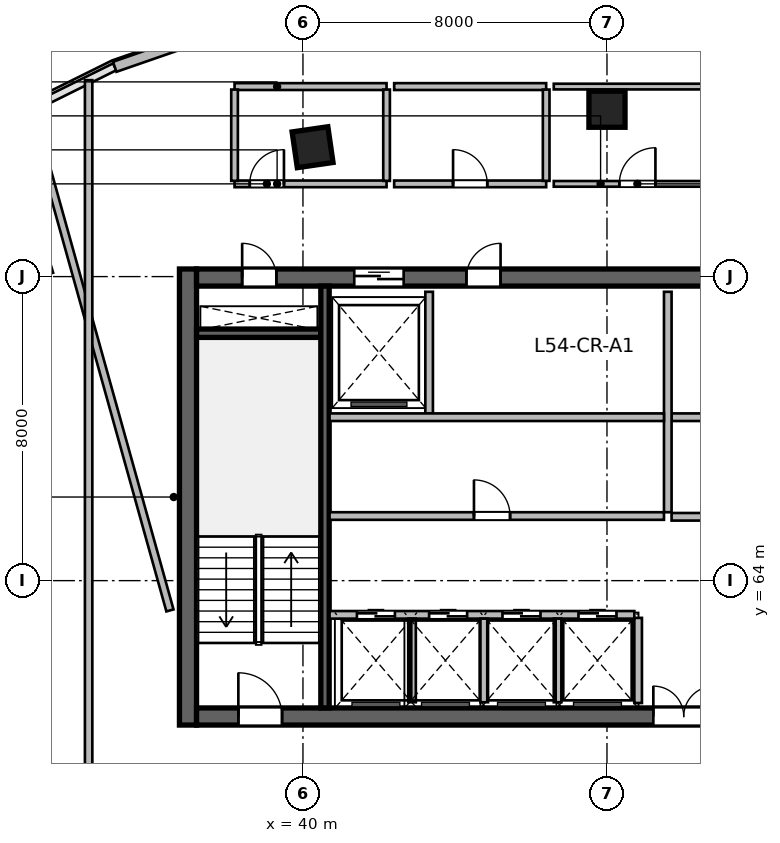
"""IFC4 building model, lengths in metres.
Left out: names, types, materials, properties, quantities, classifications, styles, units other than length and angle.
Written with IfcOpenShell. Run it as: python <this file> out.ifc"""

import sys

from ifc_helpers import new_model, si_unit, direction, frame, frame_2d, origin, origin_2d, place, context, subcontext, project, spatial, rectangle, extrude, source, transform, mapped, element, fill, save


model = new_model("IFC4")
c1 = context("Model", 3, precision=1e-05, world=origin(), true_north=direction((0.0, 1.0)))
c2 = subcontext(c1, "Body", "Model", "MODEL_VIEW")
j1 = project(units=[si_unit("LENGTHUNIT", "METRE"), si_unit("PLANEANGLEUNIT", "RADIAN")], contexts=[c1])
p1 = place(None, origin())
s1 = spatial("IfcSite", under=j1, at=p1, CompositionType="ELEMENT")
p2 = place(p1, origin())
s2 = spatial("IfcBuilding", under=s1, at=p2, CompositionType="ELEMENT")
p3 = place(p2, frame((0.0, 0.0, 223.5)))
s3 = spatial("IfcBuildingStorey", under=s2, at=p3, CompositionType="ELEMENT", Elevation=223.5)
m1 = source(origin(), c2, "Body", "SweptSolid", [
    extrude(rectangle(XDim=12.0, YDim=0.45, at=frame_2d((6.0, 0.0))), origin(), (0.0, 0.0, 1.0), 3.9),
])
p4 = place(p3, frame((36.975, 60.2, 0.0), z_axis=(0.0, 0.0, 1.0), x_axis=(0.0, 1.0, 0.0)))
e1 = element("IfcWall", 1, at=p4, inside=s3, PredefinedType="SHEAR", context=c2, shape_type="MappedRepresentation", body=[
    mapped(m1, transform((0.0, 0.0, 0.0), scale=1.0)),
])
m2 = source(origin(), c2, "Body", "SweptSolid", [
    extrude(rectangle(XDim=21.6, YDim=0.45, at=frame_2d((10.8, 0.0))), origin(), (0.0, 0.0, 1.0), 3.9),
])
p5 = place(p3, frame((37.2, 60.425, 0.0), z_axis=(0.0, 0.0, 1.0), x_axis=(1.0, 0.0, 0.0)))
e2 = element("IfcWall", 2, at=p5, inside=s3, PredefinedType="SHEAR", context=c2, shape_type="MappedRepresentation", body=[
    mapped(m2, transform((0.0, 0.0, 0.0), scale=1.0)),
])
p6 = place(p5, frame((1.1, 0.0, 0.0)))
e3 = element("IfcOpeningElement", 3, at=p6, cuts=e2, PredefinedType="OPENING", context=c2, shape_type="SweptSolid", body=[
    extrude(rectangle(XDim=1.15, YDim=2.15, at=frame_2d((0.575, 1.075))), frame((0.0, 0.235, 0.0), z_axis=(0.0, -1.0, 0.0), x_axis=(1.0, 0.0, 0.0)), (0.0, 0.0, 1.0), 0.47),
])
p7 = place(p5, frame((19.5, 0.0, 0.0)))
e4 = element("IfcOpeningElement", 4, at=p7, cuts=e2, PredefinedType="OPENING", context=c2, shape_type="SweptSolid", body=[
    extrude(rectangle(XDim=0.9, YDim=2.1, at=frame_2d((0.45, 1.05))), frame((0.0, 0.235, 0.0), z_axis=(0.0, -1.0, 0.0), x_axis=(1.0, 0.0, 0.0)), (0.0, 0.0, 1.0), 0.47),
])
p8 = place(p5, frame((12.02, 0.0, 0.0)))
e5 = element("IfcOpeningElement", 5, at=p8, cuts=e2, PredefinedType="OPENING", context=c2, shape_type="SweptSolid", body=[
    extrude(rectangle(XDim=1.6, YDim=2.15, at=frame_2d((0.8, 1.075))), frame((0.0, 0.235, 0.0), z_axis=(0.0, -1.0, 0.0), x_axis=(1.0, 0.0, 0.0)), (0.0, 0.0, 1.0), 0.47),
])
p9 = place(p3, frame((37.2, 71.975, 0.0), z_axis=(0.0, 0.0, 1.0), x_axis=(1.0, 0.0, 0.0)))
e6 = element("IfcWall", 6, at=p9, inside=s3, PredefinedType="SHEAR", context=c2, shape_type="MappedRepresentation", body=[
    mapped(m2, transform((0.0, 0.0, 0.0), scale=1.0)),
])
p10 = place(p9, frame((1.2, 0.0, 0.0)))
e7 = element("IfcOpeningElement", 7, at=p10, cuts=e6, PredefinedType="OPENING", context=c2, shape_type="SweptSolid", body=[
    extrude(rectangle(XDim=0.9, YDim=2.1, at=frame_2d((0.45, 1.05))), frame((0.0, 0.235, 0.0), z_axis=(0.0, -1.0, 0.0), x_axis=(1.0, 0.0, 0.0)), (0.0, 0.0, 1.0), 0.47),
])
p11 = place(p9, frame((14.7, 0.0, 0.0)))
e8 = element("IfcOpeningElement", 8, at=p11, cuts=e6, PredefinedType="OPENING", context=c2, shape_type="SweptSolid", body=[
    extrude(rectangle(XDim=1.2, YDim=2.15, at=frame_2d((0.6, 1.075))), frame((0.0, 0.235, 0.0), z_axis=(0.0, -1.0, 0.0), x_axis=(1.0, 0.0, 0.0)), (0.0, 0.0, 1.0), 0.47),
])
p12 = place(p9, frame((4.15, 0.0, 0.0)))
e9 = element("IfcOpeningElement", 9, at=p12, cuts=e6, PredefinedType="OPENING", context=c2, shape_type="SweptSolid", body=[
    extrude(rectangle(XDim=1.3, YDim=2.15, at=frame_2d((0.65, 1.075))), frame((0.0, 0.235, 0.0), z_axis=(0.0, -1.0, 0.0), x_axis=(1.0, 0.0, 0.0)), (0.0, 0.0, 1.0), 0.47),
])
p13 = place(p9, frame((7.1, 0.0, 0.0)))
e10 = element("IfcOpeningElement", 10, at=p13, cuts=e6, PredefinedType="OPENING", context=c2, shape_type="SweptSolid", body=[
    extrude(rectangle(XDim=0.9, YDim=2.1, at=frame_2d((0.45, 1.05))), frame((0.0, 0.235, 0.0), z_axis=(0.0, -1.0, 0.0), x_axis=(1.0, 0.0, 0.0)), (0.0, 0.0, 1.0), 0.47),
])
m3 = source(origin(), c2, "Body", "SweptSolid", [
    extrude(rectangle(XDim=3.27, YDim=0.22, at=frame_2d((1.635, 0.0))), origin(), (0.0, 0.0, 1.0), 3.9),
])
p14 = place(p3, frame((37.2, 70.51, 0.0), z_axis=(0.0, 0.0, 1.0), x_axis=(1.0, 0.0, 0.0)))
e11 = element("IfcWall", 11, at=p14, inside=s3, PredefinedType="SHEAR", context=c2, shape_type="MappedRepresentation", body=[
    mapped(m3, transform((0.0, 0.0, 0.0), scale=1.0)),
])
m4 = source(origin(), c2, "Body", "SweptSolid", [
    extrude(rectangle(XDim=11.1, YDim=0.22, at=frame_2d((5.55, 0.0))), origin(), (0.0, 0.0, 1.0), 3.9),
])
p15 = place(p3, frame((40.58, 60.65, 0.0), z_axis=(0.0, 0.0, 1.0), x_axis=(0.0, 1.0, 0.0)))
e12 = element("IfcWall", 12, at=p15, inside=s3, PredefinedType="SHEAR", context=c2, shape_type="MappedRepresentation", body=[
    mapped(m4, transform((0.0, 0.0, 0.0), scale=1.0)),
])
m5 = source(origin(), c2, "Body", "SweptSolid", [
    extrude(rectangle(XDim=0.95, YDim=0.95, at=origin_2d()), origin(), (0.0, 0.0, 1.0), 3.9),
])
for number, where, z_axis, x_axis in (
    (13, (40.253, 75.404, 0.0), (0.0, 0.0, 1.0), (-0.143, 0.99, 0.0)),
    (14, (48.0, 76.404, 0.0), (0.0, 0.0, 1.0), (0.0, 1.0, 0.0)),
):
    element("IfcColumn", number, at=place(p3, frame(where, z_axis=z_axis, x_axis=x_axis)), inside=s3, PredefinedType="COLUMN", context=c2, shape_type="MappedRepresentation", body=[
        mapped(m5, transform((0.0, 0.0, 0.0), scale=1.0)),
    ])
m6 = source(origin(), c2, "Body", "SweptSolid", [
    extrude(rectangle(XDim=4.492, YDim=0.28, at=frame_2d((2.246, 0.0))), origin(), (0.0, 0.0, 1.0), 3.64),
])
p16 = place(p3, frame((35.046, 77.52, 0.0), z_axis=(0.0, 0.0, 1.0), x_axis=(0.944872297412, 0.32743906545, 0.0)))
e15 = element("IfcWall", 15, at=p16, inside=s3, PredefinedType="SOLIDWALL", context=c2, shape_type="MappedRepresentation", body=[
    mapped(m6, transform((0.0, 0.0, 0.0), scale=1.0)),
])
m7 = source(origin(), c2, "Body", "SweptSolid", [
    extrude(rectangle(XDim=2.24, YDim=0.2, at=frame_2d((1.12, 0.0))), origin(), (0.0, 0.0, 1.0), 3.64),
])
p17 = place(p3, frame((48.82, 60.78, 0.0), z_axis=(0.0, 0.0, 1.0), x_axis=(0.0, 1.0, 0.0)))
e16 = element("IfcWall", 16, at=p17, inside=s3, PredefinedType="SOLIDWALL", context=c2, shape_type="MappedRepresentation", body=[
    mapped(m7, transform((0.0, 0.0, 0.0), scale=1.0)),
])
m8 = source(origin(), c2, "Body", "SweptSolid", [
    extrude(rectangle(XDim=5.62, YDim=0.2, at=frame_2d((2.81, 0.0))), origin(), (0.0, 0.0, 1.0), 3.64),
])
p18 = place(p3, frame((49.7, 68.3, 0.0), z_axis=(0.0, 0.0, 1.0), x_axis=(1.0, 0.0, 0.0)))
e17 = element("IfcWall", 17, at=p18, inside=s3, PredefinedType="SOLIDWALL", context=c2, shape_type="MappedRepresentation", body=[
    mapped(m8, transform((0.0, 0.0, 0.0), scale=1.0)),
])
p19 = place(p18, frame((1.6, 0.0, 0.0)))
e18 = element("IfcOpeningElement", 18, at=p19, cuts=e17, PredefinedType="OPENING", context=c2, shape_type="SweptSolid", body=[
    extrude(rectangle(XDim=1.1, YDim=2.15, at=frame_2d((0.55, 1.075))), frame((0.0, 0.11, 0.0), z_axis=(0.0, -1.0, 0.0), x_axis=(1.0, 0.0, 0.0)), (0.0, 0.0, 1.0), 0.22),
])
p20 = place(p18, frame((3.7, 0.0, 0.0)))
e19 = element("IfcOpeningElement", 19, at=p20, cuts=e17, PredefinedType="OPENING", context=c2, shape_type="SweptSolid", body=[
    extrude(rectangle(XDim=1.1, YDim=2.15, at=frame_2d((0.55, 1.075))), frame((0.0, 0.11, 0.0), z_axis=(0.0, -1.0, 0.0), x_axis=(1.0, 0.0, 0.0)), (0.0, 0.0, 1.0), 0.22),
])
m9 = source(origin(), c2, "Body", "SweptSolid", [
    extrude(rectangle(XDim=5.8, YDim=0.2, at=frame_2d((2.9, 0.0))), origin(), (0.0, 0.0, 1.0), 3.64),
])
p21 = place(p3, frame((49.6, 65.8, 0.0), z_axis=(0.0, 0.0, 1.0), x_axis=(0.0, 1.0, 0.0)))
e20 = element("IfcWall", 20, at=p21, inside=s3, PredefinedType="SOLIDWALL", context=c2, shape_type="MappedRepresentation", body=[
    mapped(m9, transform((0.0, 0.0, 0.0), scale=1.0)),
])
p22 = place(p3, frame((49.7, 65.68, 0.0), z_axis=(0.0, 0.0, 1.0), x_axis=(1.0, 0.0, 0.0)))
e21 = element("IfcWall", 21, at=p22, inside=s3, PredefinedType="SOLIDWALL", context=c2, shape_type="MappedRepresentation", body=[
    mapped(m8, transform((0.0, 0.0, 0.0), scale=1.0)),
])
m10 = source(origin(), c2, "Body", "SweptSolid", [
    extrude(rectangle(XDim=3.2, YDim=0.2, at=frame_2d((1.6, 0.0))), origin(), (0.0, 0.0, 1.0), 3.64),
])
p23 = place(p3, frame((43.32, 68.4, 0.0), z_axis=(0.0, 0.0, 1.0), x_axis=(0.0, 1.0, 0.0)))
e22 = element("IfcWall", 22, at=p23, inside=s3, PredefinedType="SOLIDWALL", context=c2, shape_type="MappedRepresentation", body=[
    mapped(m10, transform((0.0, 0.0, 0.0), scale=1.0)),
])
m11 = source(origin(), c2, "Body", "SweptSolid", [
    extrude(rectangle(XDim=8.8, YDim=0.2, at=frame_2d((4.4, 0.0))), origin(), (0.0, 0.0, 1.0), 3.64),
])
p24 = place(p3, frame((40.7, 68.3, 0.0), z_axis=(0.0, 0.0, 1.0), x_axis=(1.0, 0.0, 0.0)))
e23 = element("IfcWall", 23, at=p24, inside=s3, PredefinedType="SOLIDWALL", context=c2, shape_type="MappedRepresentation", body=[
    mapped(m11, transform((0.0, 0.0, 0.0), scale=1.0)),
])
m12 = source(origin(), c2, "Body", "SweptSolid", [
    extrude(rectangle(XDim=8.02, YDim=0.2, at=frame_2d((4.01, 0.0))), origin(), (0.0, 0.0, 1.0), 3.64),
])
p25 = place(p3, frame((40.7, 63.1, 0.0), z_axis=(0.0, 0.0, 1.0), x_axis=(1.0, 0.0, 0.0)))
e24 = element("IfcWall", 24, at=p25, inside=s3, PredefinedType="SOLIDWALL", context=c2, shape_type="MappedRepresentation", body=[
    mapped(m12, transform((0.0, 0.0, 0.0), scale=1.0)),
])
p26 = place(p25, frame((0.72, 0.0, 0.0)))
e25 = element("IfcOpeningElement", 25, at=p26, cuts=e24, PredefinedType="OPENING", context=c2, shape_type="SweptSolid", body=[
    extrude(rectangle(XDim=1.0, YDim=2.15, at=frame_2d((0.5, 1.075))), frame((0.0, 0.11, 0.0), z_axis=(0.0, -1.0, 0.0), x_axis=(1.0, 0.0, 0.0)), (0.0, 0.0, 1.0), 0.22),
])
p27 = place(p25, frame((2.62, 0.0, 0.0)))
e26 = element("IfcOpeningElement", 26, at=p27, cuts=e24, PredefinedType="OPENING", context=c2, shape_type="SweptSolid", body=[
    extrude(rectangle(XDim=1.0, YDim=2.15, at=frame_2d((0.5, 1.075))), frame((0.0, 0.11, 0.0), z_axis=(0.0, -1.0, 0.0), x_axis=(1.0, 0.0, 0.0)), (0.0, 0.0, 1.0), 0.22),
])
p28 = place(p25, frame((4.55, 0.0, 0.0)))
e27 = element("IfcOpeningElement", 27, at=p28, cuts=e24, PredefinedType="OPENING", context=c2, shape_type="SweptSolid", body=[
    extrude(rectangle(XDim=1.0, YDim=2.15, at=frame_2d((0.5, 1.075))), frame((0.0, 0.11, 0.0), z_axis=(0.0, -1.0, 0.0), x_axis=(1.0, 0.0, 0.0)), (0.0, 0.0, 1.0), 0.22),
])
p29 = place(p25, frame((6.55, 0.0, 0.0)))
e28 = element("IfcOpeningElement", 28, at=p29, cuts=e24, PredefinedType="OPENING", context=c2, shape_type="SweptSolid", body=[
    extrude(rectangle(XDim=1.0, YDim=2.15, at=frame_2d((0.5, 1.075))), frame((0.0, 0.11, 0.0), z_axis=(0.0, -1.0, 0.0), x_axis=(1.0, 0.0, 0.0)), (0.0, 0.0, 1.0), 0.22),
])
m13 = source(origin(), c2, "Body", "SweptSolid", [
    extrude(rectangle(XDim=2.2, YDim=0.2, at=frame_2d((1.1, 0.0))), origin(), (0.0, 0.0, 1.0), 3.64),
])
for number, where, z_axis, x_axis in (
    (29, (42.87, 60.8, 0.0), (0.0, 0.0, 1.0), (0.0, 1.0, 0.0)),
    (30, (44.77, 60.8, 0.0), (0.0, 0.0, 1.0), (0.0, 1.0, 0.0)),
    (31, (46.7, 60.8, 0.0), (0.0, 0.0, 1.0), (0.0, 1.0, 0.0)),
):
    element("IfcWall", number, at=place(p3, frame(where, z_axis=z_axis, x_axis=x_axis)), inside=s3, PredefinedType="SOLIDWALL", context=c2, shape_type="MappedRepresentation", body=[
        mapped(m13, transform((0.0, 0.0, 0.0), scale=1.0)),
    ])
p30 = place(p3, frame((40.7, 65.7, 0.0), z_axis=(0.0, 0.0, 1.0), x_axis=(1.0, 0.0, 0.0)))
e32 = element("IfcWall", 32, at=p30, inside=s3, PredefinedType="SOLIDWALL", context=c2, shape_type="MappedRepresentation", body=[
    mapped(m11, transform((0.0, 0.0, 0.0), scale=1.0)),
])
p31 = place(p30, frame((3.8, 0.0, 0.0)))
e33 = element("IfcOpeningElement", 33, at=p31, cuts=e32, PredefinedType="OPENING", context=c2, shape_type="SweptSolid", body=[
    extrude(rectangle(XDim=0.95, YDim=2.15, at=frame_2d((0.475, 1.075))), frame((0.0, 0.11, 0.0), z_axis=(0.0, -1.0, 0.0), x_axis=(1.0, 0.0, 0.0)), (0.0, 0.0, 1.0), 0.22),
])
m14 = source(origin(), c2, "Body", "SweptSolid", [
    extrude(rectangle(XDim=4.0, YDim=0.175, at=frame_2d((2.0, 0.0))), origin(), (0.0, 0.0, 1.0), 3.64),
])
p32 = place(p3, frame((38.2, 74.44, 0.0), z_axis=(0.0, 0.0, 1.0), x_axis=(1.0, 0.0, 0.0)))
e34 = element("IfcWall", 34, at=p32, inside=s3, PredefinedType="PARTITIONING", context=c2, shape_type="MappedRepresentation", body=[
    mapped(m14, transform((0.0, 0.0, 0.0), scale=1.0)),
])
p33 = place(p32, frame((0.4, 0.0, 0.0)))
e35 = element("IfcOpeningElement", 35, at=p33, cuts=e34, PredefinedType="OPENING", context=c2, shape_type="SweptSolid", body=[
    extrude(rectangle(XDim=0.9, YDim=2.08, at=frame_2d((0.45, 1.04))), frame((0.0, 0.098, 0.0), z_axis=(0.0, -1.0, 0.0), x_axis=(1.0, 0.0, 0.0)), (0.0, 0.0, 1.0), 0.195),
])
m15 = source(origin(), c2, "Body", "SweptSolid", [
    extrude(rectangle(XDim=4.0, YDim=0.18, at=frame_2d((2.0, 0.0))), origin(), (0.0, 0.0, 1.0), 3.64),
])
p34 = place(p3, frame((38.2, 77.0, 0.0), z_axis=(0.0, 0.0, 1.0), x_axis=(1.0, 0.0, 0.0)))
e36 = element("IfcWall", 36, at=p34, inside=s3, PredefinedType="PLUMBINGWALL", context=c2, shape_type="MappedRepresentation", body=[
    mapped(m15, transform((0.0, 0.0, 0.0), scale=1.0)),
])
m16 = source(origin(), c2, "Body", "SweptSolid", [
    extrude(rectangle(XDim=2.403, YDim=0.175, at=frame_2d((1.201, 0.0))), origin(), (0.0, 0.0, 1.0), 3.64),
])
for number, where, z_axis, x_axis in (
    (37, (38.2, 74.519, 0.0), (0.0, 0.0, 1.0), (0.0, 1.0, 0.0)),
    (38, (42.2, 74.519, 0.0), (0.0, 0.0, 1.0), (0.0, 1.0, 0.0)),
):
    element("IfcWall", number, at=place(p3, frame(where, z_axis=z_axis, x_axis=x_axis)), inside=s3, PredefinedType="PARTITIONING", context=c2, shape_type="MappedRepresentation", body=[
        mapped(m16, transform((0.0, 0.0, 0.0), scale=1.0)),
    ])
p35 = place(p3, frame((42.4, 74.44, 0.0), z_axis=(0.0, 0.0, 1.0), x_axis=(1.0, 0.0, 0.0)))
e39 = element("IfcWall", 39, at=p35, inside=s3, PredefinedType="PARTITIONING", context=c2, shape_type="MappedRepresentation", body=[
    mapped(m14, transform((0.0, 0.0, 0.0), scale=1.0)),
])
p36 = place(p35, frame((1.55, 0.0, 0.0)))
e40 = element("IfcOpeningElement", 40, at=p36, cuts=e39, PredefinedType="OPENING", context=c2, shape_type="SweptSolid", body=[
    extrude(rectangle(XDim=0.9, YDim=2.08, at=frame_2d((0.45, 1.04))), frame((0.0, 0.098, 0.0), z_axis=(0.0, -1.0, 0.0), x_axis=(1.0, 0.0, 0.0)), (0.0, 0.0, 1.0), 0.195),
])
p37 = place(p3, frame((42.4, 77.0, 0.0), z_axis=(0.0, 0.0, 1.0), x_axis=(1.0, 0.0, 0.0)))
e41 = element("IfcWall", 41, at=p37, inside=s3, PredefinedType="PLUMBINGWALL", context=c2, shape_type="MappedRepresentation", body=[
    mapped(m15, transform((0.0, 0.0, 0.0), scale=1.0)),
])
p38 = place(p3, frame((46.4, 74.519, 0.0), z_axis=(0.0, 0.0, 1.0), x_axis=(0.0, 1.0, 0.0)))
e42 = element("IfcWall", 42, at=p38, inside=s3, PredefinedType="PARTITIONING", context=c2, shape_type="MappedRepresentation", body=[
    mapped(m16, transform((0.0, 0.0, 0.0), scale=1.0)),
])
m17 = source(origin(), c2, "Body", "SweptSolid", [
    extrude(rectangle(XDim=4.4, YDim=0.15, at=frame_2d((2.2, 0.0))), origin(), (0.0, 0.0, 1.0), 3.64),
])
p39 = place(p3, frame((46.6, 74.44, 0.0), z_axis=(0.0, 0.0, 1.0), x_axis=(1.0, 0.0, 0.0)))
e43 = element("IfcWall", 43, at=p39, inside=s3, PredefinedType="PARTITIONING", context=c2, shape_type="MappedRepresentation", body=[
    mapped(m17, transform((0.0, 0.0, 0.0), scale=1.0)),
])
p40 = place(p39, frame((1.725, 0.0, 0.0)))
e44 = element("IfcOpeningElement", 44, at=p40, cuts=e43, PredefinedType="OPENING", context=c2, shape_type="SweptSolid", body=[
    extrude(rectangle(XDim=0.95, YDim=2.1, at=frame_2d((0.475, 1.05))), frame((0.0, 0.085, 0.0), z_axis=(0.0, -1.0, 0.0), x_axis=(1.0, 0.0, 0.0)), (0.0, 0.0, 1.0), 0.17),
])
p41 = place(p3, frame((46.6, 77.0, 0.0), z_axis=(0.0, 0.0, 1.0), x_axis=(1.0, 0.0, 0.0)))
e45 = element("IfcWall", 45, at=p41, inside=s3, PredefinedType="PARTITIONING", context=c2, shape_type="MappedRepresentation", body=[
    mapped(m17, transform((0.0, 0.0, 0.0), scale=1.0)),
])
m18 = source(origin(), c2, "Body", "SweptSolid", [
    extrude(rectangle(XDim=13.694, YDim=0.195, at=frame_2d((6.847, 0.0))), origin(), (0.0, 0.0, 1.0), 3.64),
])
p42 = place(p3, frame((36.5, 63.216, 0.0), z_axis=(0.0, 0.0, 1.0), x_axis=(-0.268753576604, 0.963208967495, 0.0)))
e46 = element("IfcWall", 46, at=p42, inside=s3, PredefinedType="PARTITIONING", context=c2, shape_type="MappedRepresentation", body=[
    mapped(m18, transform((0.0, 0.0, 0.0), scale=1.0)),
])
m19 = source(origin(), c2, "Body", "SweptSolid", [
    extrude(rectangle(XDim=19.209, YDim=0.195, at=frame_2d((9.604, 0.0))), origin(), (0.0, 0.0, 1.0), 3.64),
])
p43 = place(p3, frame((34.36, 57.96, 0.0), z_axis=(0.0, 0.0, 1.0), x_axis=(0.0, 1.0, 0.0)))
e47 = element("IfcWall", 47, at=p43, inside=s3, PredefinedType="PARTITIONING", context=c2, shape_type="MappedRepresentation", body=[
    mapped(m19, transform((0.0, 0.0, 0.0), scale=1.0)),
])
m20 = source(origin(), c2, "Body", "SweptSolid", [
    extrude(rectangle(XDim=1.15, YDim=2.15, at=frame_2d((0.575, 1.075))), frame((0.0, 0.025, 0.0), z_axis=(0.0, -1.0, 0.0), x_axis=(1.0, 0.0, 0.0)), (0.0, 0.0, 1.0), 0.05),
])
p44 = place(p6, origin())
e48 = element("IfcDoor", 48, at=p44, inside=s3, OperationType="SINGLE_SWING_LEFT", PredefinedType="DOOR", context=c2, shape_type="MappedRepresentation", body=[
    mapped(m20, transform((0.0, 0.0, 0.0), scale=1.0)),
])
fill(e3, e48)
m21 = source(origin(), c2, "Body", "SweptSolid", [
    extrude(rectangle(XDim=0.9, YDim=2.1, at=frame_2d((0.45, 1.05))), frame((0.0, 0.025, 0.0), z_axis=(0.0, -1.0, 0.0), x_axis=(1.0, 0.0, 0.0)), (0.0, 0.0, 1.0), 0.05),
])
p45 = place(p10, origin())
e49 = element("IfcDoor", 49, at=p45, inside=s3, OperationType="SINGLE_SWING_LEFT", PredefinedType="DOOR", context=c2, shape_type="MappedRepresentation", body=[
    mapped(m21, transform((0.0, 0.0, 0.0), scale=1.0)),
])
fill(e7, e49)
m22 = source(origin(), c2, "Body", "SweptSolid", [
    extrude(rectangle(XDim=1.6, YDim=2.15, at=frame_2d((0.8, 1.075))), frame((0.0, 0.025, 0.0), z_axis=(0.0, -1.0, 0.0), x_axis=(1.0, 0.0, 0.0)), (0.0, 0.0, 1.0), 0.05),
])
p46 = place(p8, origin())
e50 = element("IfcDoor", 50, at=p46, inside=s3, OperationType="DOUBLE_DOOR_SINGLE_SWING", PredefinedType="DOOR", context=c2, shape_type="MappedRepresentation", body=[
    mapped(m22, transform((0.0, 0.0, 0.0), scale=1.0)),
])
fill(e5, e50)
m23 = source(origin(), c2, "Body", "SweptSolid", [
    extrude(rectangle(XDim=1.3, YDim=2.15, at=frame_2d((0.65, 1.075))), frame((0.0, 0.025, 0.0), z_axis=(0.0, -1.0, 0.0), x_axis=(1.0, 0.0, 0.0)), (0.0, 0.0, 1.0), 0.05),
])
p47 = place(p12, origin())
e51 = element("IfcDoor", 51, at=p47, inside=s3, OperationType="DOUBLE_DOOR_SLIDING", PredefinedType="DOOR", context=c2, shape_type="MappedRepresentation", body=[
    mapped(m23, transform((0.0, 0.0, 0.0), scale=1.0)),
])
fill(e9, e51)
p48 = place(p13, origin())
e52 = element("IfcDoor", 52, at=p48, inside=s3, OperationType="SINGLE_SWING_RIGHT", PredefinedType="DOOR", context=c2, shape_type="MappedRepresentation", body=[
    mapped(m21, transform((0.0, 0.0, 0.0), scale=1.0)),
])
fill(e10, e52)
m24 = source(origin(), c2, "Body", "SweptSolid", [
    extrude(rectangle(XDim=1.0, YDim=2.15, at=frame_2d((0.5, 1.075))), frame((0.0, 0.025, 0.0), z_axis=(0.0, -1.0, 0.0), x_axis=(1.0, 0.0, 0.0)), (0.0, 0.0, 1.0), 0.05),
])
p49 = place(p26, origin())
e53 = element("IfcDoor", 53, at=p49, inside=s3, OperationType="DOUBLE_DOOR_SLIDING", PredefinedType="DOOR", context=c2, shape_type="MappedRepresentation", body=[
    mapped(m24, transform((0.0, 0.0, 0.0), scale=1.0)),
])
fill(e25, e53)
p50 = place(p27, origin())
e54 = element("IfcDoor", 54, at=p50, inside=s3, OperationType="DOUBLE_DOOR_SLIDING", PredefinedType="DOOR", context=c2, shape_type="MappedRepresentation", body=[
    mapped(m24, transform((0.0, 0.0, 0.0), scale=1.0)),
])
fill(e26, e54)
p51 = place(p28, origin())
e55 = element("IfcDoor", 55, at=p51, inside=s3, OperationType="DOUBLE_DOOR_SLIDING", PredefinedType="DOOR", context=c2, shape_type="MappedRepresentation", body=[
    mapped(m24, transform((0.0, 0.0, 0.0), scale=1.0)),
])
fill(e27, e55)
p52 = place(p29, origin())
e56 = element("IfcDoor", 56, at=p52, inside=s3, OperationType="DOUBLE_DOOR_SLIDING", PredefinedType="DOOR", context=c2, shape_type="MappedRepresentation", body=[
    mapped(m24, transform((0.0, 0.0, 0.0), scale=1.0)),
])
fill(e28, e56)
m25 = source(origin(), c2, "Body", "SweptSolid", [
    extrude(rectangle(XDim=0.95, YDim=2.15, at=frame_2d((0.475, 1.075))), frame((0.0, 0.025, 0.0), z_axis=(0.0, -1.0, 0.0), x_axis=(1.0, 0.0, 0.0)), (0.0, 0.0, 1.0), 0.05),
])
p53 = place(p31, origin())
e57 = element("IfcDoor", 57, at=p53, inside=s3, OperationType="SINGLE_SWING_LEFT", PredefinedType="DOOR", context=c2, shape_type="MappedRepresentation", body=[
    mapped(m25, transform((0.0, 0.0, 0.0), scale=1.0)),
])
fill(e33, e57)
m26 = source(origin(), c2, "Body", "SweptSolid", [
    extrude(rectangle(XDim=0.9, YDim=2.08, at=frame_2d((0.45, 1.04))), frame((0.0, 0.025, 0.0), z_axis=(0.0, -1.0, 0.0), x_axis=(1.0, 0.0, 0.0)), (0.0, 0.0, 1.0), 0.05),
])
p54 = place(p33, origin())
e58 = element("IfcDoor", 58, at=p54, inside=s3, OperationType="SINGLE_SWING_RIGHT", PredefinedType="DOOR", context=c2, shape_type="MappedRepresentation", body=[
    mapped(m26, transform((0.0, 0.0, 0.0), scale=1.0)),
])
fill(e35, e58)
p55 = place(p36, origin())
e59 = element("IfcDoor", 59, at=p55, inside=s3, OperationType="SINGLE_SWING_LEFT", PredefinedType="DOOR", context=c2, shape_type="MappedRepresentation", body=[
    mapped(m26, transform((0.0, 0.0, 0.0), scale=1.0)),
])
fill(e40, e59)
m27 = source(origin(), c2, "Body", "SweptSolid", [
    extrude(rectangle(XDim=0.95, YDim=2.1, at=frame_2d((0.475, 1.05))), frame((0.0, 0.025, 0.0), z_axis=(0.0, -1.0, 0.0), x_axis=(1.0, 0.0, 0.0)), (0.0, 0.0, 1.0), 0.05),
])
p56 = place(p40, origin())
e60 = element("IfcDoor", 60, at=p56, inside=s3, OperationType="SINGLE_SWING_RIGHT", PredefinedType="DOOR", context=c2, shape_type="MappedRepresentation", body=[
    mapped(m27, transform((0.0, 0.0, 0.0), scale=1.0)),
])
fill(e44, e60)
save(model, sys.argv[1])
